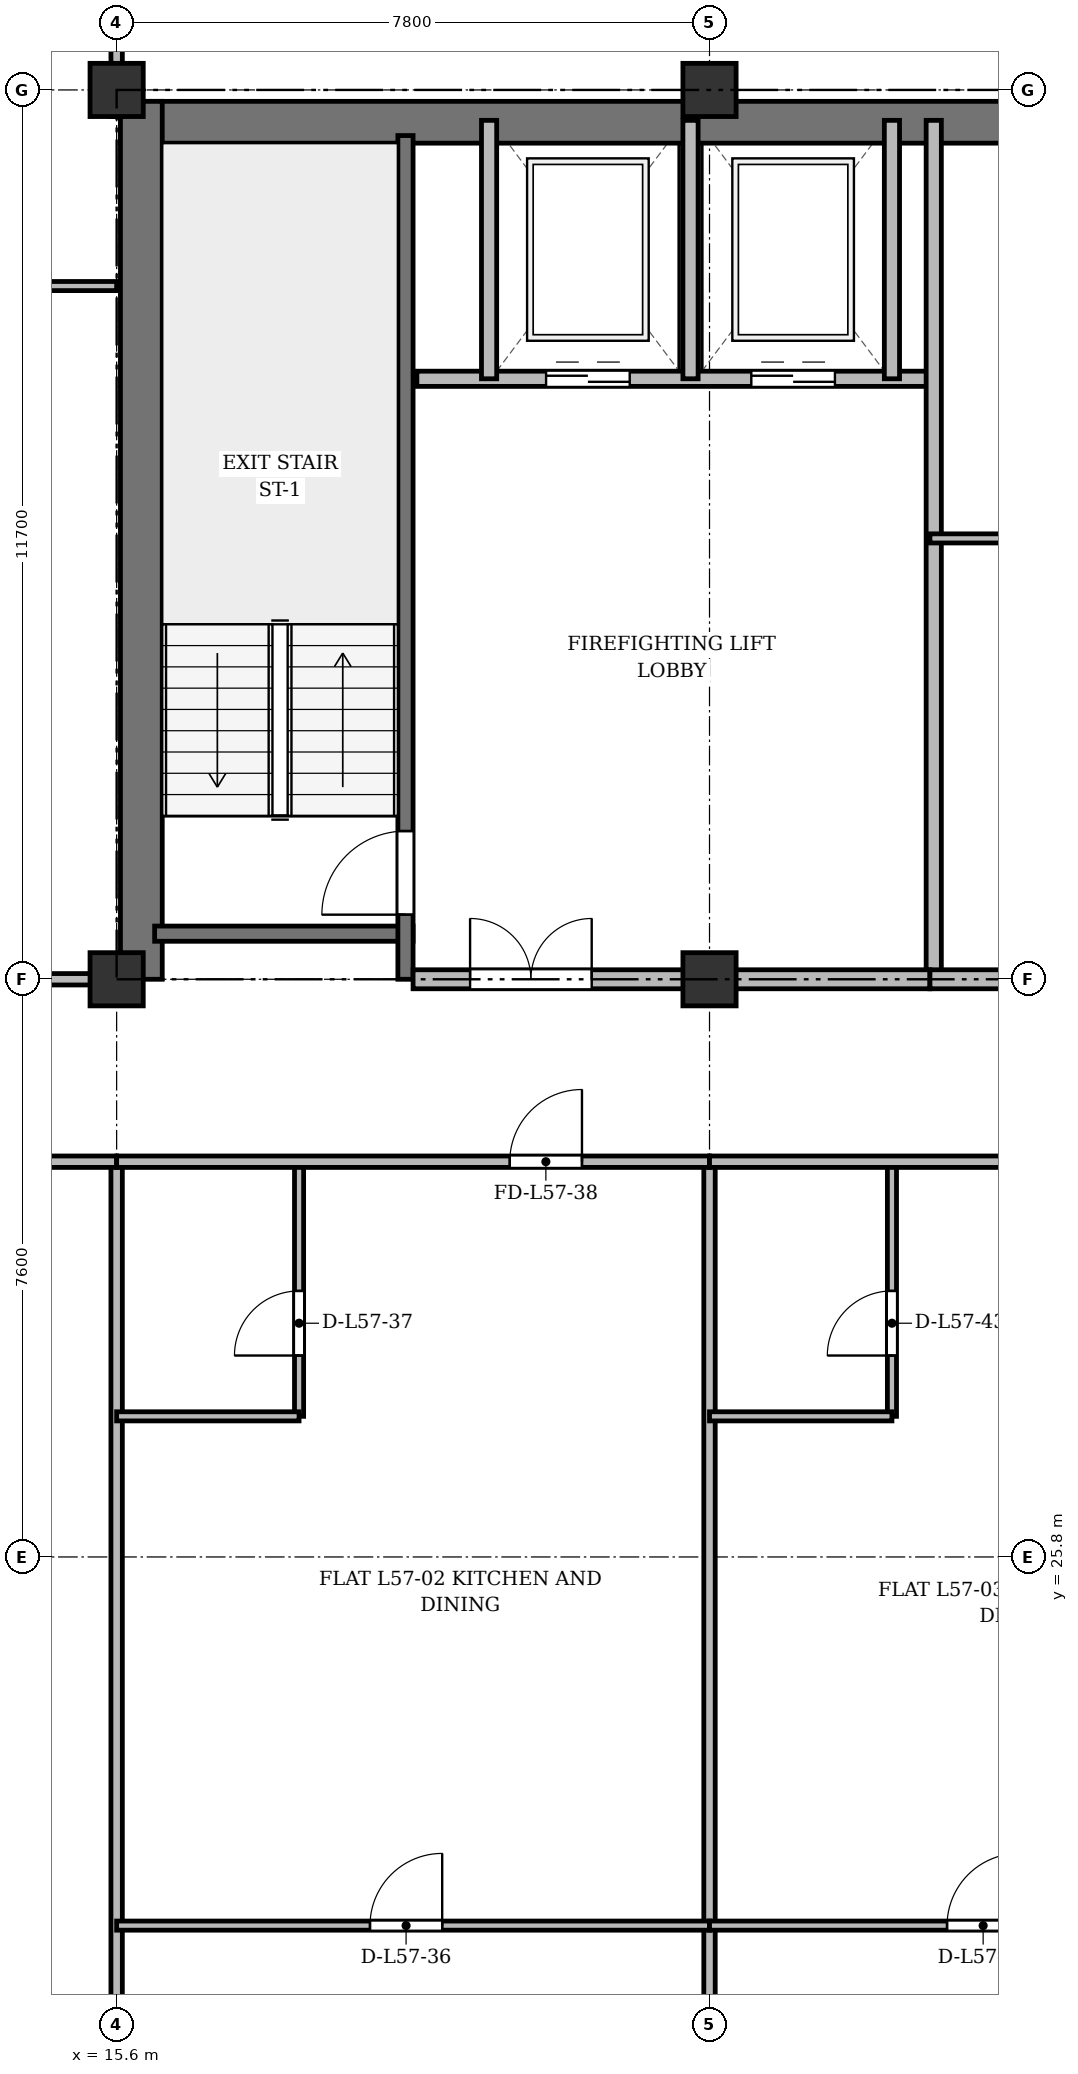
"""IFC4 building model, lengths in metres.
Left out: names, types, materials, properties, quantities, classifications, styles, units other than length and angle.
Written with IfcOpenShell. Run it as: python <this file> out.ifc"""

import sys

from ifc_helpers import new_model, si_unit, direction, frame, frame_2d, origin, origin_2d, place, context, subcontext, project, spatial, rectangle, extrude, source, transform, mapped, element, fill, save


model = new_model("IFC4")
c1 = context("Model", 3, precision=1e-05, world=origin(), true_north=direction((0.0, 1.0)))
c2 = subcontext(c1, "Body", "Model", "MODEL_VIEW")
j1 = project(units=[si_unit("LENGTHUNIT", "METRE"), si_unit("PLANEANGLEUNIT", "RADIAN")], contexts=[c1])
p1 = place(None, origin())
s1 = spatial("IfcSite", under=j1, at=p1, CompositionType="ELEMENT")
p2 = place(p1, origin())
s2 = spatial("IfcBuilding", under=s1, at=p2, CompositionType="ELEMENT")
p3 = place(p2, frame((0.0, 0.0, 219.3)))
s3 = spatial("IfcBuildingStorey", under=s2, at=p3, CompositionType="ELEMENT", Elevation=219.3)
m1 = source(origin(), c2, "Body", "SweptSolid", [
    extrude(rectangle(XDim=0.7, YDim=0.7, at=origin_2d()), origin(), (0.0, 0.0, 1.0), 3.6),
])
for number, where, z_axis, x_axis in (
    (1, (15.6, 33.4, 0.0), (0.0, 0.0, 1.0), (1.0, 0.0, 0.0)),
    (2, (15.6, 45.1, 0.0), (0.0, 0.0, 1.0), (1.0, 0.0, 0.0)),
    (3, (23.4, 33.4, 0.0), (0.0, 0.0, 1.0), (1.0, 0.0, 0.0)),
    (4, (23.4, 45.1, 0.0), (0.0, 0.0, 1.0), (1.0, 0.0, 0.0)),
):
    element("IfcColumn", number, at=place(p3, frame(where, z_axis=z_axis, x_axis=x_axis)), inside=s3, PredefinedType="COLUMN", context=c2, shape_type="MappedRepresentation", body=[
        mapped(m1, transform((0.0, 0.0, 0.0), x_axis=(1.0, 0.0, 0.0), y_axis=(0.0, 1.0, 0.0), z_axis=(0.0, 0.0, 1.0), scale=1.0)),
    ])
p4 = place(p3, frame((15.65, 44.675, 0.0), z_axis=(0.0, 0.0, 1.0), x_axis=(1.0, 0.0, 0.0)))
e5 = element("IfcWall", 5, at=p4, inside=s3, PredefinedType="SHEAR", context=c2, shape_type="SweptSolid", body=[
    extrude(rectangle(XDim=43.1, YDim=0.55, at=frame_2d((21.55, 0.0))), origin(), (0.0, 0.0, 1.0), 3.36),
])
p5 = place(p3, frame((15.925, 33.4, 0.0), z_axis=(0.0, 0.0, 1.0), x_axis=(0.0, 1.0, 0.0)))
e6 = element("IfcWall", 6, at=p5, inside=s3, PredefinedType="SHEAR", context=c2, shape_type="SweptSolid", body=[
    extrude(rectangle(XDim=11.55, YDim=0.55, at=frame_2d((5.775, 0.0))), origin(), (0.0, 0.0, 1.0), 3.36),
])
p6 = place(p3, frame((16.1, 34.0, 0.0), z_axis=(0.0, 0.0, 1.0), x_axis=(1.0, 0.0, 0.0)))
e7 = element("IfcWall", 7, at=p6, inside=s3, PredefinedType="SHEAR", context=c2, shape_type="SweptSolid", body=[
    extrude(rectangle(XDim=3.4, YDim=0.2, at=frame_2d((1.7, 0.0))), origin(), (0.0, 0.0, 1.0), 3.36),
])
p7 = place(p3, frame((19.4, 33.4, 0.0), z_axis=(0.0, 0.0, 1.0), x_axis=(0.0, 1.0, 0.0)))
e8 = element("IfcWall", 8, at=p7, inside=s3, PredefinedType="SHEAR", context=c2, shape_type="SweptSolid", body=[
    extrude(rectangle(XDim=11.1, YDim=0.2, at=frame_2d((5.55, 0.0))), origin(), (0.0, 0.0, 1.0), 3.36),
])
p8 = place(p7, frame((0.85, 0.0, 0.0)))
e9 = element("IfcOpeningElement", 9, at=p8, cuts=e8, PredefinedType="OPENING", context=c2, shape_type="SweptSolid", body=[
    extrude(rectangle(XDim=1.1, YDim=2.15, at=frame_2d((0.55, 1.075))), frame((0.0, 0.11, 0.0), z_axis=(0.0, -1.0, 0.0), x_axis=(1.0, 0.0, 0.0)), (0.0, 0.0, 1.0), 0.22),
])
p9 = place(p3, frame((19.55, 41.3, 0.0), z_axis=(0.0, 0.0, 1.0), x_axis=(1.0, 0.0, 0.0)))
e10 = element("IfcWall", 10, at=p9, inside=s3, PredefinedType="SOLIDWALL", context=c2, shape_type="SweptSolid", body=[
    extrude(rectangle(XDim=6.75, YDim=0.2, at=frame_2d((3.375, 0.0))), origin(), (0.0, 0.0, 1.0), 3.36),
])
p10 = place(p9, frame((1.7, 0.0, 0.0)))
e11 = element("IfcOpeningElement", 11, at=p10, cuts=e10, PredefinedType="OPENING", context=c2, shape_type="SweptSolid", body=[
    extrude(rectangle(XDim=1.1, YDim=2.15, at=frame_2d((0.55, 1.075))), frame((0.0, 0.11, 0.0), z_axis=(0.0, -1.0, 0.0), x_axis=(1.0, 0.0, 0.0)), (0.0, 0.0, 1.0), 0.22),
])
p11 = place(p9, frame((4.4, 0.0, 0.0)))
e12 = element("IfcOpeningElement", 12, at=p11, cuts=e10, PredefinedType="OPENING", context=c2, shape_type="SweptSolid", body=[
    extrude(rectangle(XDim=1.1, YDim=2.15, at=frame_2d((0.55, 1.075))), frame((0.0, 0.11, 0.0), z_axis=(0.0, -1.0, 0.0), x_axis=(1.0, 0.0, 0.0)), (0.0, 0.0, 1.0), 0.22),
])
for number, where, z_axis, x_axis in (
    (13, (20.5, 41.3, 0.0), (0.0, 0.0, 1.0), (0.0, 1.0, 0.0)),
    (14, (23.15, 41.3, 0.0), (0.0, 0.0, 1.0), (0.0, 1.0, 0.0)),
    (15, (25.8, 41.3, 0.0), (0.0, 0.0, 1.0), (0.0, 1.0, 0.0)),
):
    element("IfcWall", number, at=place(p3, frame(where, z_axis=z_axis, x_axis=x_axis)), inside=s3, PredefinedType="SOLIDWALL", context=c2, shape_type="SweptSolid", body=[
        extrude(rectangle(XDim=3.4, YDim=0.2, at=frame_2d((1.7, 0.0))), origin(), (0.0, 0.0, 1.0), 3.36),
    ])
p12 = place(p3, frame((26.35, 33.4, 0.0), z_axis=(0.0, 0.0, 1.0), x_axis=(0.0, 1.0, 0.0)))
e16 = element("IfcWall", 16, at=p12, inside=s3, PredefinedType="SOLIDWALL", context=c2, shape_type="SweptSolid", body=[
    extrude(rectangle(XDim=11.3, YDim=0.2, at=frame_2d((5.65, 0.0))), origin(), (0.0, 0.0, 1.0), 2.91),
])
p13 = place(p3, frame((19.5, 33.4, 0.0), z_axis=(0.0, 0.0, 1.0), x_axis=(1.0, 0.0, 0.0)))
e17 = element("IfcWall", 17, at=p13, inside=s3, PredefinedType="PARTITIONING", context=c2, shape_type="SweptSolid", body=[
    extrude(rectangle(XDim=6.8, YDim=0.25, at=frame_2d((3.4, 0.0))), origin(), (0.0, 0.0, 1.0), 2.91),
])
p14 = place(p13, frame((0.75, 0.0, 0.0)))
e18 = element("IfcOpeningElement", 18, at=p14, cuts=e17, PredefinedType="OPENING", context=c2, shape_type="SweptSolid", body=[
    extrude(rectangle(XDim=1.6, YDim=2.2, at=frame_2d((0.8, 1.1))), frame((0.0, 0.135, 0.0), z_axis=(0.0, -1.0, 0.0), x_axis=(1.0, 0.0, 0.0)), (0.0, 0.0, 1.0), 0.27),
])
p15 = place(p3, frame((26.3, 39.2, 0.0), z_axis=(0.0, 0.0, 1.0), x_axis=(1.0, 0.0, 0.0)))
e19 = element("IfcWall", 19, at=p15, inside=s3, PredefinedType="PARTITIONING", context=c2, shape_type="SweptSolid", body=[
    extrude(rectangle(XDim=7.0, YDim=0.12, at=frame_2d((3.5, 0.0))), origin(), (0.0, 0.0, 1.0), 2.86),
])
p16 = place(p15, frame((2.6, 0.0, 0.0)))
e20 = element("IfcOpeningElement", 20, at=p16, cuts=e19, PredefinedType="OPENING", context=c2, shape_type="SweptSolid", body=[
    extrude(rectangle(XDim=0.95, YDim=2.15, at=frame_2d((0.475, 1.075))), frame((0.0, 0.07, 0.0), z_axis=(0.0, -1.0, 0.0), x_axis=(1.0, 0.0, 0.0)), (0.0, 0.0, 1.0), 0.14),
])
p17 = place(p3, frame((26.3, 33.4, 0.0), z_axis=(0.0, 0.0, 1.0), x_axis=(1.0, 0.0, 0.0)))
e21 = element("IfcWall", 21, at=p17, inside=s3, PredefinedType="PARTITIONING", context=c2, shape_type="SweptSolid", body=[
    extrude(rectangle(XDim=7.0, YDim=0.25, at=frame_2d((3.5, 0.0))), origin(), (0.0, 0.0, 1.0), 2.91),
])
p18 = place(p17, frame((1.35, 0.0, 0.0)))
e22 = element("IfcOpeningElement", 22, at=p18, cuts=e21, PredefinedType="OPENING", context=c2, shape_type="SweptSolid", body=[
    extrude(rectangle(XDim=0.95, YDim=2.15, at=frame_2d((0.475, 1.075))), frame((0.0, 0.135, 0.0), z_axis=(0.0, -1.0, 0.0), x_axis=(1.0, 0.0, 0.0)), (0.0, 0.0, 1.0), 0.27),
])
p19 = place(p3, frame((11.925, 42.52, 0.0), z_axis=(0.0, 0.0, 1.0), x_axis=(1.0, 0.0, 0.0)))
e23 = element("IfcWall", 23, at=p19, inside=s3, PredefinedType="PARTITIONING", context=c2, shape_type="SweptSolid", body=[
    extrude(rectangle(XDim=3.675, YDim=0.12, at=frame_2d((1.837, 0.0))), origin(), (0.0, 0.0, 1.0), 2.86),
])
p20 = place(p19, frame((1.362, 0.0, 0.0)))
e24 = element("IfcOpeningElement", 24, at=p20, cuts=e23, PredefinedType="OPENING", context=c2, shape_type="SweptSolid", body=[
    extrude(rectangle(XDim=0.95, YDim=2.15, at=frame_2d((0.475, 1.075))), frame((0.0, 0.07, 0.0), z_axis=(0.0, -1.0, 0.0), x_axis=(1.0, 0.0, 0.0)), (0.0, 0.0, 1.0), 0.14),
])
p21 = place(p3, frame((8.25, 33.4, 0.0), z_axis=(0.0, 0.0, 1.0), x_axis=(1.0, 0.0, 0.0)))
e25 = element("IfcWall", 25, at=p21, inside=s3, PredefinedType="PARTITIONING", context=c2, shape_type="SweptSolid", body=[
    extrude(rectangle(XDim=7.35, YDim=0.15, at=frame_2d((3.675, 0.0))), origin(), (0.0, 0.0, 1.0), 2.91),
])
p22 = place(p21, frame((4.275, 0.0, 0.0)))
e26 = element("IfcOpeningElement", 26, at=p22, cuts=e25, PredefinedType="OPENING", context=c2, shape_type="SweptSolid", body=[
    extrude(rectangle(XDim=0.95, YDim=2.15, at=frame_2d((0.475, 1.075))), frame((0.0, 0.085, 0.0), z_axis=(0.0, -1.0, 0.0), x_axis=(1.0, 0.0, 0.0)), (0.0, 0.0, 1.0), 0.17),
])
p23 = place(p3, frame((15.6, 44.75, 0.0), z_axis=(0.0, 0.0, 1.0), x_axis=(0.0, 1.0, 0.0)))
e27 = element("IfcWall", 27, at=p23, inside=s3, PredefinedType="PARTITIONING", context=c2, shape_type="SweptSolid", body=[
    extrude(rectangle(XDim=3.61, YDim=0.15, at=frame_2d((1.805, 0.0))), origin(), (0.0, 0.0, 1.0), 2.86),
])
p24 = place(p23, frame((1.1, 0.0, 0.0)))
e28 = element("IfcOpeningElement", 28, at=p24, cuts=e27, PredefinedType="OPENING", context=c2, shape_type="SweptSolid", body=[
    extrude(rectangle(XDim=0.95, YDim=2.15, at=frame_2d((0.475, 1.075))), frame((0.0, 0.085, 0.0), z_axis=(0.0, -1.0, 0.0), x_axis=(1.0, 0.0, 0.0)), (0.0, 0.0, 1.0), 0.17),
])
for number, where, z_axis, x_axis in (
    (29, (15.6, 3.625, 0.0), (0.0, 0.0, 1.0), (0.0, 1.0, 0.0)),
    (30, (23.4, 3.625, 0.0), (0.0, 0.0, 1.0), (0.0, 1.0, 0.0)),
):
    element("IfcWall", number, at=place(p3, frame(where, z_axis=z_axis, x_axis=x_axis)), inside=s3, PredefinedType="PARTITIONING", context=c2, shape_type="SweptSolid", body=[
        extrude(rectangle(XDim=27.375, YDim=0.15, at=frame_2d((13.688, 0.0))), origin(), (0.0, 0.0, 1.0), 2.86),
    ])
p25 = place(p3, frame((8.225, 31.0, 0.0), z_axis=(0.0, 0.0, 1.0), x_axis=(1.0, 0.0, 0.0)))
e31 = element("IfcWall", 31, at=p25, inside=s3, PredefinedType="PARTITIONING", context=c2, shape_type="SweptSolid", body=[
    extrude(rectangle(XDim=7.375, YDim=0.15, at=frame_2d((3.688, 0.0))), origin(), (0.0, 0.0, 1.0), 2.86),
])
p26 = place(p25, frame((4.877, 0.0, 0.0)))
e32 = element("IfcOpeningElement", 32, at=p26, cuts=e31, PredefinedType="OPENING", context=c2, shape_type="SweptSolid", body=[
    extrude(rectangle(XDim=0.95, YDim=2.15, at=frame_2d((0.475, 1.075))), frame((0.0, 0.085, 0.0), z_axis=(0.0, -1.0, 0.0), x_axis=(1.0, 0.0, 0.0)), (0.0, 0.0, 1.0), 0.17),
])
p27 = place(p3, frame((15.6, 20.95, 0.0), z_axis=(0.0, 0.0, 1.0), x_axis=(1.0, 0.0, 0.0)))
e33 = element("IfcWall", 33, at=p27, inside=s3, PredefinedType="PARTITIONING", context=c2, shape_type="SweptSolid", body=[
    extrude(rectangle(XDim=7.8, YDim=0.12, at=frame_2d((3.9, 0.0))), origin(), (0.0, 0.0, 1.0), 2.86),
])
p28 = place(p27, frame((3.333, 0.0, 0.0)))
e34 = element("IfcOpeningElement", 34, at=p28, cuts=e33, PredefinedType="OPENING", context=c2, shape_type="SweptSolid", body=[
    extrude(rectangle(XDim=0.95, YDim=2.15, at=frame_2d((0.475, 1.075))), frame((0.0, 0.07, 0.0), z_axis=(0.0, -1.0, 0.0), x_axis=(1.0, 0.0, 0.0)), (0.0, 0.0, 1.0), 0.14),
])
p29 = place(p3, frame((18.0, 27.65, 0.0), z_axis=(0.0, 0.0, 1.0), x_axis=(0.0, 1.0, 0.0)))
e35 = element("IfcWall", 35, at=p29, inside=s3, PredefinedType="PARTITIONING", context=c2, shape_type="SweptSolid", body=[
    extrude(rectangle(XDim=3.35, YDim=0.12, at=frame_2d((1.675, 0.0))), origin(), (0.0, 0.0, 1.0), 3.36),
])
p30 = place(p29, frame((0.8, 0.0, 0.0)))
e36 = element("IfcOpeningElement", 36, at=p30, cuts=e35, PredefinedType="OPENING", context=c2, shape_type="SweptSolid", body=[
    extrude(rectangle(XDim=0.85, YDim=2.1, at=frame_2d((0.425, 1.05))), frame((0.0, 0.07, 0.0), z_axis=(0.0, -1.0, 0.0), x_axis=(1.0, 0.0, 0.0)), (0.0, 0.0, 1.0), 0.14),
])
p31 = place(p3, frame((15.6, 27.65, 0.0), z_axis=(0.0, 0.0, 1.0), x_axis=(1.0, 0.0, 0.0)))
e37 = element("IfcWall", 37, at=p31, inside=s3, PredefinedType="PARTITIONING", context=c2, shape_type="SweptSolid", body=[
    extrude(rectangle(XDim=2.4, YDim=0.12, at=frame_2d((1.2, 0.0))), origin(), (0.0, 0.0, 1.0), 2.86),
])
p32 = place(p3, frame((15.6, 31.0, 0.0), z_axis=(0.0, 0.0, 1.0), x_axis=(1.0, 0.0, 0.0)))
e38 = element("IfcWall", 38, at=p32, inside=s3, PredefinedType="PARTITIONING", context=c2, shape_type="SweptSolid", body=[
    extrude(rectangle(XDim=7.8, YDim=0.15, at=frame_2d((3.9, 0.0))), origin(), (0.0, 0.0, 1.0), 2.86),
])
p33 = place(p32, frame((5.172, 0.0, 0.0)))
e39 = element("IfcOpeningElement", 39, at=p33, cuts=e38, PredefinedType="OPENING", context=c2, shape_type="SweptSolid", body=[
    extrude(rectangle(XDim=0.95, YDim=2.15, at=frame_2d((0.475, 1.075))), frame((0.0, 0.085, 0.0), z_axis=(0.0, -1.0, 0.0), x_axis=(1.0, 0.0, 0.0)), (0.0, 0.0, 1.0), 0.17),
])
p34 = place(p3, frame((23.4, 20.95, 0.0), z_axis=(0.0, 0.0, 1.0), x_axis=(1.0, 0.0, 0.0)))
e40 = element("IfcWall", 40, at=p34, inside=s3, PredefinedType="PARTITIONING", context=c2, shape_type="SweptSolid", body=[
    extrude(rectangle(XDim=7.2, YDim=0.12, at=frame_2d((3.6, 0.0))), origin(), (0.0, 0.0, 1.0), 2.86),
])
p35 = place(p34, frame((3.125, 0.0, 0.0)))
e41 = element("IfcOpeningElement", 41, at=p35, cuts=e40, PredefinedType="OPENING", context=c2, shape_type="SweptSolid", body=[
    extrude(rectangle(XDim=0.95, YDim=2.15, at=frame_2d((0.475, 1.075))), frame((0.0, 0.07, 0.0), z_axis=(0.0, -1.0, 0.0), x_axis=(1.0, 0.0, 0.0)), (0.0, 0.0, 1.0), 0.14),
])
p36 = place(p3, frame((25.8, 27.65, 0.0), z_axis=(0.0, 0.0, 1.0), x_axis=(0.0, 1.0, 0.0)))
e42 = element("IfcWall", 42, at=p36, inside=s3, PredefinedType="PARTITIONING", context=c2, shape_type="SweptSolid", body=[
    extrude(rectangle(XDim=3.35, YDim=0.12, at=frame_2d((1.675, 0.0))), origin(), (0.0, 0.0, 1.0), 3.36),
])
p37 = place(p36, frame((0.8, 0.0, 0.0)))
e43 = element("IfcOpeningElement", 43, at=p37, cuts=e42, PredefinedType="OPENING", context=c2, shape_type="SweptSolid", body=[
    extrude(rectangle(XDim=0.85, YDim=2.1, at=frame_2d((0.425, 1.05))), frame((0.0, 0.07, 0.0), z_axis=(0.0, -1.0, 0.0), x_axis=(1.0, 0.0, 0.0)), (0.0, 0.0, 1.0), 0.14),
])
p38 = place(p3, frame((23.4, 27.65, 0.0), z_axis=(0.0, 0.0, 1.0), x_axis=(1.0, 0.0, 0.0)))
e44 = element("IfcWall", 44, at=p38, inside=s3, PredefinedType="PARTITIONING", context=c2, shape_type="SweptSolid", body=[
    extrude(rectangle(XDim=2.4, YDim=0.12, at=frame_2d((1.2, 0.0))), origin(), (0.0, 0.0, 1.0), 2.86),
])
p39 = place(p3, frame((23.4, 31.0, 0.0), z_axis=(0.0, 0.0, 1.0), x_axis=(1.0, 0.0, 0.0)))
e45 = element("IfcWall", 45, at=p39, inside=s3, PredefinedType="PARTITIONING", context=c2, shape_type="SweptSolid", body=[
    extrude(rectangle(XDim=7.2, YDim=0.15, at=frame_2d((3.6, 0.0))), origin(), (0.0, 0.0, 1.0), 2.86),
])
p40 = place(p39, frame((4.706, 0.0, 0.0)))
e46 = element("IfcOpeningElement", 46, at=p40, cuts=e45, PredefinedType="OPENING", context=c2, shape_type="SweptSolid", body=[
    extrude(rectangle(XDim=0.95, YDim=2.15, at=frame_2d((0.475, 1.075))), frame((0.0, 0.085, 0.0), z_axis=(0.0, -1.0, 0.0), x_axis=(1.0, 0.0, 0.0)), (0.0, 0.0, 1.0), 0.17),
])
m2 = source(origin(), c2, "Body", "SweptSolid", [
    extrude(rectangle(XDim=1.1, YDim=2.15, at=frame_2d((0.55, 1.075))), frame((0.0, 0.025, 0.0), z_axis=(0.0, -1.0, 0.0), x_axis=(1.0, 0.0, 0.0)), (0.0, 0.0, 1.0), 0.05),
])
p41 = place(p8, origin())
e47 = element("IfcDoor", 47, at=p41, inside=s3, OperationType="SINGLE_SWING_LEFT", PredefinedType="DOOR", context=c2, shape_type="MappedRepresentation", body=[
    mapped(m2, transform((0.0, 0.0, 0.0), x_axis=(1.0, 0.0, 0.0), y_axis=(0.0, 1.0, 0.0), z_axis=(0.0, 0.0, 1.0), scale=1.0)),
])
fill(e9, e47)
p42 = place(p10, origin())
e48 = element("IfcDoor", 48, at=p42, inside=s3, OperationType="DOUBLE_DOOR_SLIDING", PredefinedType="DOOR", context=c2, shape_type="MappedRepresentation", body=[
    mapped(m2, transform((0.0, 0.0, 0.0), x_axis=(1.0, 0.0, 0.0), y_axis=(0.0, 1.0, 0.0), z_axis=(0.0, 0.0, 1.0), scale=1.0)),
])
fill(e11, e48)
p43 = place(p11, origin())
e49 = element("IfcDoor", 49, at=p43, inside=s3, OperationType="DOUBLE_DOOR_SLIDING", PredefinedType="DOOR", context=c2, shape_type="MappedRepresentation", body=[
    mapped(m2, transform((0.0, 0.0, 0.0), x_axis=(1.0, 0.0, 0.0), y_axis=(0.0, 1.0, 0.0), z_axis=(0.0, 0.0, 1.0), scale=1.0)),
])
fill(e12, e49)
m3 = source(origin(), c2, "Body", "SweptSolid", [
    extrude(rectangle(XDim=1.6, YDim=2.2, at=frame_2d((0.8, 1.1))), frame((0.0, 0.025, 0.0), z_axis=(0.0, -1.0, 0.0), x_axis=(1.0, 0.0, 0.0)), (0.0, 0.0, 1.0), 0.05),
])
p44 = place(p14, origin())
e50 = element("IfcDoor", 50, at=p44, inside=s3, OperationType="DOUBLE_DOOR_SINGLE_SWING", PredefinedType="DOOR", context=c2, shape_type="MappedRepresentation", body=[
    mapped(m3, transform((0.0, 0.0, 0.0), x_axis=(1.0, 0.0, 0.0), y_axis=(0.0, 1.0, 0.0), z_axis=(0.0, 0.0, 1.0), scale=1.0)),
])
fill(e18, e50)
m4 = source(origin(), c2, "Body", "SweptSolid", [
    extrude(rectangle(XDim=0.95, YDim=2.15, at=frame_2d((0.475, 1.075))), frame((0.0, 0.025, 0.0), z_axis=(0.0, -1.0, 0.0), x_axis=(1.0, 0.0, 0.0)), (0.0, 0.0, 1.0), 0.05),
])
p45 = place(p28, origin())
e51 = element("IfcDoor", 51, at=p45, inside=s3, OperationType="SINGLE_SWING_RIGHT", PredefinedType="DOOR", context=c2, shape_type="MappedRepresentation", body=[
    mapped(m4, transform((0.0, 0.0, 0.0), x_axis=(1.0, 0.0, 0.0), y_axis=(0.0, 1.0, 0.0), z_axis=(0.0, 0.0, 1.0), scale=1.0)),
])
fill(e34, e51)
m5 = source(origin(), c2, "Body", "SweptSolid", [
    extrude(rectangle(XDim=0.85, YDim=2.1, at=frame_2d((0.425, 1.05))), frame((0.0, 0.025, 0.0), z_axis=(0.0, -1.0, 0.0), x_axis=(1.0, 0.0, 0.0)), (0.0, 0.0, 1.0), 0.05),
])
p46 = place(p30, origin())
e52 = element("IfcDoor", 52, at=p46, inside=s3, OperationType="SINGLE_SWING_LEFT", PredefinedType="DOOR", context=c2, shape_type="MappedRepresentation", body=[
    mapped(m5, transform((0.0, 0.0, 0.0), x_axis=(1.0, 0.0, 0.0), y_axis=(0.0, 1.0, 0.0), z_axis=(0.0, 0.0, 1.0), scale=1.0)),
])
fill(e36, e52)
p47 = place(p33, origin())
e53 = element("IfcDoor", 53, at=p47, inside=s3, OperationType="SINGLE_SWING_RIGHT", PredefinedType="DOOR", context=c2, shape_type="MappedRepresentation", body=[
    mapped(m4, transform((0.0, 0.0, 0.0), x_axis=(1.0, 0.0, 0.0), y_axis=(0.0, 1.0, 0.0), z_axis=(0.0, 0.0, 1.0), scale=1.0)),
])
fill(e39, e53)
p48 = place(p35, origin())
e54 = element("IfcDoor", 54, at=p48, inside=s3, OperationType="SINGLE_SWING_RIGHT", PredefinedType="DOOR", context=c2, shape_type="MappedRepresentation", body=[
    mapped(m4, transform((0.0, 0.0, 0.0), x_axis=(1.0, 0.0, 0.0), y_axis=(0.0, 1.0, 0.0), z_axis=(0.0, 0.0, 1.0), scale=1.0)),
])
fill(e41, e54)
p49 = place(p37, origin())
e55 = element("IfcDoor", 55, at=p49, inside=s3, OperationType="SINGLE_SWING_LEFT", PredefinedType="DOOR", context=c2, shape_type="MappedRepresentation", body=[
    mapped(m5, transform((0.0, 0.0, 0.0), x_axis=(1.0, 0.0, 0.0), y_axis=(0.0, 1.0, 0.0), z_axis=(0.0, 0.0, 1.0), scale=1.0)),
])
fill(e43, e55)
save(model, sys.argv[1])
